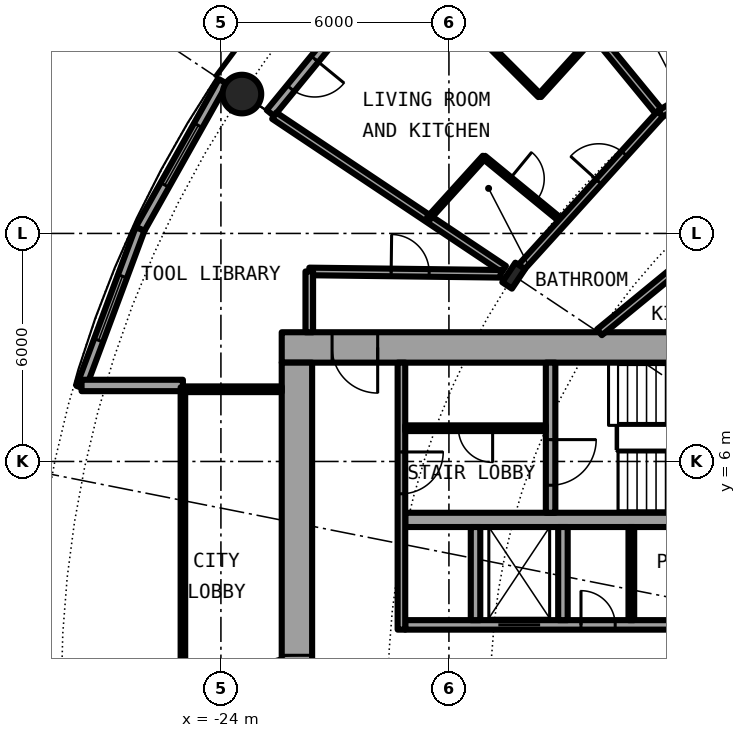
"""IFC4 building model, lengths in metres.
Left out: names, types, materials, properties, quantities, classifications, styles, units other than length and angle.
Written with IfcOpenShell. Run it as: python <this file> out.ifc"""

import sys

from ifc_helpers import new_model, si_unit, direction, frame, frame_2d, origin, origin_2d, place, context, subcontext, project, spatial, rectangle, hollow_circle, i_section, extrude, element, fill, save


model = new_model("IFC4")
c1 = context("Model", 3, precision=1e-05, world=origin(), true_north=direction((0.0, 1.0)))
c2 = subcontext(c1, "Body", "Model", "MODEL_VIEW")
j1 = project(units=[si_unit("LENGTHUNIT", "METRE"), si_unit("PLANEANGLEUNIT", "RADIAN")], contexts=[c1])
p1 = place(None, origin())
s1 = spatial("IfcSite", under=j1, at=p1, CompositionType="ELEMENT")
p2 = place(p1, origin())
s2 = spatial("IfcBuilding", under=s1, at=p2, CompositionType="ELEMENT")
p3 = place(p2, frame((0.0, 0.0, 22.8)))
s3 = spatial("IfcBuildingStorey", under=s2, at=p3, CompositionType="ELEMENT", Elevation=22.8)
p4 = place(p3, frame((-23.448, 15.667, 0.0), z_axis=(0.0, 0.0, 1.0), x_axis=(1.0, 0.0, 0.0)))
e1 = element("IfcColumn", 1, at=p4, inside=s3, PredefinedType="COLUMN", context=c2, shape_type="SweptSolid", body=[
    extrude(hollow_circle(Radius=0.508, WallThickness=0.05, at=origin_2d()), origin(), (0.0, 0.0, 1.0), 3.05),
])
p5 = place(p3, frame((-16.297, 10.889, 0.0), z_axis=(0.0, 0.0, 1.0), x_axis=(-0.831469612303, 0.55557023302, 0.0)))
e2 = element("IfcColumn", 2, at=p5, inside=s3, PredefinedType="COLUMN", context=c2, shape_type="SweptSolid", body=[
    extrude(i_section(OverallWidth=0.305, OverallDepth=0.62, WebThickness=0.021, FlangeThickness=0.04, FilletRadius=0.027, at=origin_2d()), origin(), (0.0, 0.0, 1.0), 3.05),
])
p6 = place(p3, frame((-19.304, 19.304, 0.0), z_axis=(0.0, 0.0, 1.0), x_axis=(-0.634382322723, -0.773019449054, 0.0)))
e3 = element("IfcWall", 3, at=p6, inside=s3, PredefinedType="SOLIDWALL", context=c2, shape_type="SweptSolid", body=[
    extrude(rectangle(XDim=5.352, YDim=0.25, at=frame_2d((2.676, 0.0))), origin(), (0.0, 0.0, 1.0), 2.7),
])
p7 = place(p6, frame((0.441, 0.0, 0.3)))
e4 = element("IfcOpeningElement", 4, at=p7, cuts=e3, PredefinedType="OPENING", context=c2, shape_type="SweptSolid", body=[
    extrude(rectangle(XDim=1.8, YDim=2.1, at=frame_2d((0.9, 1.05))), frame((0.0, 0.135, 0.0), z_axis=(0.0, -1.0, 0.0), x_axis=(1.0, 0.0, 0.0)), (0.0, 0.0, 1.0), 0.27),
])
p8 = place(p6, frame((3.51, 0.0, 0.0)))
e5 = element("IfcOpeningElement", 5, at=p8, cuts=e3, PredefinedType="OPENING", context=c2, shape_type="SweptSolid", body=[
    extrude(rectangle(XDim=1.0, YDim=2.2, at=frame_2d((0.5, 1.1))), frame((0.0, 0.135, 0.0), z_axis=(0.0, -1.0, 0.0), x_axis=(1.0, 0.0, 0.0)), (0.0, 0.0, 1.0), 0.27),
])
p9 = place(p3, frame((-23.946, 16.0, 0.0), z_axis=(0.0, 0.0, 1.0), x_axis=(-0.489696356642, -0.871893042919, 0.0)))
e6 = element("IfcWall", 6, at=p9, inside=s3, PredefinedType="SOLIDWALL", context=c2, shape_type="SweptSolid", body=[
    extrude(rectangle(XDim=4.454, YDim=0.25, at=frame_2d((2.227, 0.0))), origin(), (0.0, 0.0, 1.0), 2.7),
])
p10 = place(p9, frame((1.327, 0.0, 0.3)))
e7 = element("IfcOpeningElement", 7, at=p10, cuts=e6, PredefinedType="OPENING", context=c2, shape_type="SweptSolid", body=[
    extrude(rectangle(XDim=1.8, YDim=2.1, at=frame_2d((0.9, 1.05))), frame((0.0, 0.135, 0.0), z_axis=(0.0, -1.0, 0.0), x_axis=(1.0, 0.0, 0.0)), (0.0, 0.0, 1.0), 0.27),
])
p11 = place(p3, frame((-26.127, 12.117, 0.0), z_axis=(0.0, 0.0, 1.0), x_axis=(-0.349247811493, -0.937030397675, 0.0)))
e8 = element("IfcWall", 8, at=p11, inside=s3, PredefinedType="SOLIDWALL", context=c2, shape_type="SweptSolid", body=[
    extrude(rectangle(XDim=4.452, YDim=0.25, at=frame_2d((2.226, 0.0))), origin(), (0.0, 0.0, 1.0), 2.7),
])
p12 = place(p11, frame((1.327, 0.0, 0.3)))
e9 = element("IfcOpeningElement", 9, at=p12, cuts=e8, PredefinedType="OPENING", context=c2, shape_type="SweptSolid", body=[
    extrude(rectangle(XDim=1.8, YDim=2.1, at=frame_2d((0.9, 1.05))), frame((0.0, 0.135, 0.0), z_axis=(0.0, -1.0, 0.0), x_axis=(1.0, 0.0, 0.0)), (0.0, 0.0, 1.0), 0.27),
])
p13 = place(p3, frame((-25.0, 8.0, 0.0), z_axis=(0.0, 0.0, 1.0), x_axis=(-1.0, 0.0, 0.0)))
e10 = element("IfcWall", 10, at=p13, inside=s3, PredefinedType="SOLIDWALL", context=c2, shape_type="SweptSolid", body=[
    extrude(rectangle(XDim=2.667, YDim=0.3, at=frame_2d((1.333, 0.0))), origin(), (0.0, 0.0, 1.0), 2.7),
])
p14 = place(p3, frame((-8.2, 9.0, 0.0), z_axis=(0.0, 0.0, 1.0), x_axis=(-1.0, 0.0, 0.0)))
e11 = element("IfcWall", 11, at=p14, inside=s3, PredefinedType="SHEAR", context=c2, shape_type="SweptSolid", body=[
    extrude(rectangle(XDim=14.2, YDim=0.8, at=frame_2d((7.1, 0.0))), origin(), (0.0, 0.0, 1.0), 3.05),
])
p15 = place(p14, frame((11.675, 0.0, 0.0)))
e12 = element("IfcOpeningElement", 12, at=p15, cuts=e11, PredefinedType="OPENING", context=c2, shape_type="SweptSolid", body=[
    extrude(rectangle(XDim=1.2, YDim=2.3, at=frame_2d((0.6, 1.15))), frame((0.0, 0.41, 0.0), z_axis=(0.0, -1.0, 0.0), x_axis=(1.0, 0.0, 0.0)), (0.0, 0.0, 1.0), 0.82),
])
p16 = place(p3, frame((-22.0, -8.6, 0.0), z_axis=(0.0, 0.0, 1.0), x_axis=(0.0, 1.0, 0.0)))
e13 = element("IfcWall", 13, at=p16, inside=s3, PredefinedType="SHEAR", context=c2, shape_type="SweptSolid", body=[
    extrude(rectangle(XDim=17.2, YDim=0.8, at=frame_2d((8.6, 0.0))), origin(), (0.0, 0.0, 1.0), 3.05),
])
p17 = place(p16, frame((7.7, 0.0, 0.0)))
e14 = element("IfcOpeningElement", 14, at=p17, cuts=e13, PredefinedType="OPENING", context=c2, shape_type="SweptSolid", body=[
    extrude(rectangle(XDim=1.8, YDim=2.3, at=frame_2d((0.9, 1.15))), frame((0.0, 0.41, 0.0), z_axis=(0.0, -1.0, 0.0), x_axis=(1.0, 0.0, 0.0)), (0.0, 0.0, 1.0), 0.82),
])
p18 = place(p3, frame((-19.15, 1.7, 0.0), z_axis=(0.0, 0.0, 1.0), x_axis=(1.0, 0.0, 0.0)))
e15 = element("IfcWall", 15, at=p18, inside=s3, PredefinedType="SHEAR", context=c2, shape_type="SweptSolid", body=[
    extrude(rectangle(XDim=10.15, YDim=0.25, at=frame_2d((5.075, 0.0))), origin(), (0.0, 0.0, 1.0), 3.05),
])
p19 = place(p18, frame((2.45, 0.0, 0.0)))
e16 = element("IfcOpeningElement", 16, at=p19, cuts=e15, PredefinedType="OPENING", context=c2, shape_type="SweptSolid", body=[
    extrude(rectangle(XDim=1.1, YDim=2.3, at=frame_2d((0.55, 1.15))), frame((0.0, 0.135, 0.0), z_axis=(0.0, -1.0, 0.0), x_axis=(1.0, 0.0, 0.0)), (0.0, 0.0, 1.0), 0.27),
])
p20 = place(p18, frame((7.637, 0.0, 0.0)))
e17 = element("IfcOpeningElement", 17, at=p20, cuts=e15, PredefinedType="OPENING", context=c2, shape_type="SweptSolid", body=[
    extrude(rectangle(XDim=0.9, YDim=2.3, at=frame_2d((0.45, 1.15))), frame((0.0, 0.135, 0.0), z_axis=(0.0, -1.0, 0.0), x_axis=(1.0, 0.0, 0.0)), (0.0, 0.0, 1.0), 0.27),
])
p21 = place(p18, frame((4.625, 0.0, 0.0)))
e18 = element("IfcOpeningElement", 18, at=p21, cuts=e15, PredefinedType="OPENING", context=c2, shape_type="SweptSolid", body=[
    extrude(rectangle(XDim=0.9, YDim=2.3, at=frame_2d((0.45, 1.15))), frame((0.0, 0.135, 0.0), z_axis=(0.0, -1.0, 0.0), x_axis=(1.0, 0.0, 0.0)), (0.0, 0.0, 1.0), 0.27),
])
p22 = place(p3, frame((-9.0, 4.462, 0.0), z_axis=(0.0, 0.0, 1.0), x_axis=(-1.0, 0.0, 0.0)))
e19 = element("IfcWall", 19, at=p22, inside=s3, PredefinedType="SHEAR", context=c2, shape_type="SweptSolid", body=[
    extrude(rectangle(XDim=10.15, YDim=0.375, at=frame_2d((5.075, 0.0))), origin(), (0.0, 0.0, 1.0), 3.05),
])
p23 = place(p3, frame((-15.325, 8.6, 0.0), z_axis=(0.0, 0.0, 1.0), x_axis=(0.0, -1.0, 0.0)))
e20 = element("IfcWall", 20, at=p23, inside=s3, PredefinedType="SHEAR", context=c2, shape_type="SweptSolid", body=[
    extrude(rectangle(XDim=3.95, YDim=0.25, at=frame_2d((1.975, 0.0))), origin(), (0.0, 0.0, 1.0), 3.05),
])
p24 = place(p23, frame((2.025, 0.0, 0.0)))
e21 = element("IfcOpeningElement", 21, at=p24, cuts=e20, PredefinedType="OPENING", context=c2, shape_type="SweptSolid", body=[
    extrude(rectangle(XDim=1.2, YDim=2.3, at=frame_2d((0.6, 1.15))), frame((0.0, 0.135, 0.0), z_axis=(0.0, -1.0, 0.0), x_axis=(1.0, 0.0, 0.0)), (0.0, 0.0, 1.0), 0.27),
])
for number, where, z_axis, x_axis in (
    (22, (-15.0, 1.825, 0.0), (0.0, 0.0, 1.0), (0.0, 1.0, 0.0)),
    (23, (-17.3, 1.825, 0.0), (0.0, 0.0, 1.0), (0.0, 1.0, 0.0)),
):
    element("IfcWall", number, at=place(p3, frame(where, z_axis=z_axis, x_axis=x_axis)), inside=s3, PredefinedType="SOLIDWALL", context=c2, shape_type="SweptSolid", body=[
        extrude(rectangle(XDim=2.45, YDim=0.25, at=frame_2d((1.225, 0.0))), origin(), (0.0, 0.0, 1.0), 2.7),
    ])
p25 = place(p3, frame((-19.25, 8.6, 0.0), z_axis=(0.0, 0.0, 1.0), x_axis=(0.0, -1.0, 0.0)))
e24 = element("IfcWall", 24, at=p25, inside=s3, PredefinedType="SOLIDWALL", context=c2, shape_type="SweptSolid", body=[
    extrude(rectangle(XDim=7.025, YDim=0.2, at=frame_2d((3.513, 0.0))), origin(), (0.0, 0.0, 1.0), 2.7),
])
p26 = place(p25, frame((2.35, 0.0, 0.0)))
e25 = element("IfcOpeningElement", 25, at=p26, cuts=e24, PredefinedType="OPENING", context=c2, shape_type="SweptSolid", body=[
    extrude(rectangle(XDim=1.1, YDim=2.3, at=frame_2d((0.55, 1.15))), frame((0.0, 0.11, 0.0), z_axis=(0.0, -1.0, 0.0), x_axis=(1.0, 0.0, 0.0)), (0.0, 0.0, 1.0), 0.22),
])
p27 = place(p3, frame((-13.2, 1.825, 0.0), z_axis=(0.0, 0.0, 1.0), x_axis=(0.0, 1.0, 0.0)))
e26 = element("IfcWall", 26, at=p27, inside=s3, PredefinedType="PARTITIONING", context=c2, shape_type="SweptSolid", body=[
    extrude(rectangle(XDim=2.45, YDim=0.15, at=frame_2d((1.225, 0.0))), origin(), (0.0, 0.0, 1.0), 2.7),
])
p28 = place(p3, frame((-15.45, 6.875, 0.0), z_axis=(0.0, 0.0, 1.0), x_axis=(-1.0, 0.0, 0.0)))
e27 = element("IfcWall", 27, at=p28, inside=s3, PredefinedType="PARTITIONING", context=c2, shape_type="SweptSolid", body=[
    extrude(rectangle(XDim=3.7, YDim=0.15, at=frame_2d((1.85, 0.0))), origin(), (0.0, 0.0, 1.0), 2.7),
])
p29 = place(p28, frame((1.4, 0.0, 0.0)))
e28 = element("IfcOpeningElement", 28, at=p29, cuts=e27, PredefinedType="OPENING", context=c2, shape_type="SweptSolid", body=[
    extrude(rectangle(XDim=0.9, YDim=2.3, at=frame_2d((0.45, 1.15))), frame((0.0, 0.085, 0.0), z_axis=(0.0, -1.0, 0.0), x_axis=(1.0, 0.0, 0.0)), (0.0, 0.0, 1.0), 0.17),
])
p30 = place(p3, frame((-22.4, 7.9, 0.0), z_axis=(0.0, 0.0, 1.0), x_axis=(-1.0, 0.0, 0.0)))
e29 = element("IfcWall", 29, at=p30, inside=s3, PredefinedType="PARTITIONING", context=c2, shape_type="SweptSolid", body=[
    extrude(rectangle(XDim=2.54, YDim=0.15, at=frame_2d((1.27, 0.0))), origin(), (0.0, 0.0, 1.0), 2.7),
])
p31 = place(p3, frame((-25.0, 7.95, 0.0), z_axis=(0.0, 0.0, 1.0), x_axis=(0.0, -1.0, 0.0)))
e30 = element("IfcWall", 30, at=p31, inside=s3, PredefinedType="PARTITIONING", context=c2, shape_type="SweptSolid", body=[
    extrude(rectangle(XDim=15.9, YDim=0.12, at=frame_2d((7.95, 0.0))), origin(), (0.0, 0.0, 1.0), 2.7),
])
p32 = place(p31, frame((0.95, 0.0, 0.1)))
e31 = element("IfcOpeningElement", 31, at=p32, cuts=e30, PredefinedType="OPENING", context=c2, shape_type="SweptSolid", body=[
    extrude(rectangle(XDim=14.0, YDim=2.35, at=frame_2d((7.0, 1.175))), frame((0.0, 0.07, 0.0), z_axis=(0.0, -1.0, 0.0), x_axis=(1.0, 0.0, 0.0)), (0.0, 0.0, 1.0), 0.14),
])
p33 = place(p3, frame((-22.596, 15.097, 0.0), z_axis=(0.0, 0.0, 1.0), x_axis=(0.831507055747, -0.555514190857, 0.0)))
e32 = element("IfcWall", 32, at=p33, inside=s3, PredefinedType="PARTITIONING", context=c2, shape_type="SweptSolid", body=[
    extrude(rectangle(XDim=7.265, YDim=0.2, at=frame_2d((3.633, 0.0))), origin(), (0.0, 0.0, 1.0), 2.7),
])
p34 = place(p3, frame((-19.21, 19.222, 0.0), z_axis=(0.0, 0.0, 1.0), x_axis=(0.706914880313, -0.707298629994, 0.0)))
e33 = element("IfcWall", 33, at=p34, inside=s3, PredefinedType="PARTITIONING", context=c2, shape_type="SweptSolid", body=[
    extrude(rectangle(XDim=5.09, YDim=0.1, at=frame_2d((2.545, 0.0))), origin(), (0.0, 0.0, 1.0), 2.7),
])
p35 = place(p34, frame((2.095, 0.0, 0.0)))
e34 = element("IfcOpeningElement", 34, at=p35, cuts=e33, PredefinedType="OPENING", context=c2, shape_type="SweptSolid", body=[
    extrude(rectangle(XDim=0.9, YDim=2.3, at=frame_2d((0.45, 1.15))), frame((0.0, 0.06, 0.0), z_axis=(0.0, -1.0, 0.0), x_axis=(1.0, 0.0, 0.0)), (0.0, 0.0, 1.0), 0.12),
])
p36 = place(p3, frame((-17.239, 21.008, 0.0), z_axis=(0.0, 0.0, 1.0), x_axis=(0.634318093068, -0.773072154981, 0.0)))
e35 = element("IfcWall", 35, at=p36, inside=s3, PredefinedType="PARTITIONING", context=c2, shape_type="SweptSolid", body=[
    extrude(rectangle(XDim=7.576, YDim=0.2, at=frame_2d((3.788, 0.0))), origin(), (0.0, 0.0, 1.0), 2.7),
])
p37 = place(p3, frame((-17.079, 14.004, 0.0), z_axis=(0.0, 0.0, 1.0), x_axis=(0.773424377054, -0.633888580887, 0.0)))
e36 = element("IfcWall", 36, at=p37, inside=s3, PredefinedType="PARTITIONING", context=c2, shape_type="SweptSolid", body=[
    extrude(rectangle(XDim=2.675, YDim=0.1, at=frame_2d((1.338, 0.0))), origin(), (0.0, 0.0, 1.0), 2.7),
])
p38 = place(p37, frame((0.888, 0.0, 0.0)))
e37 = element("IfcOpeningElement", 37, at=p38, cuts=e36, PredefinedType="OPENING", context=c2, shape_type="SweptSolid", body=[
    extrude(rectangle(XDim=0.9, YDim=2.3, at=frame_2d((0.45, 1.15))), frame((0.0, 0.06, 0.0), z_axis=(0.0, -1.0, 0.0), x_axis=(1.0, 0.0, 0.0)), (0.0, 0.0, 1.0), 0.12),
])
p39 = place(p3, frame((-12.276, 18.36, 0.0), z_axis=(0.0, 0.0, 1.0), x_axis=(0.55563200073, -0.831428337119, 0.0)))
e38 = element("IfcWall", 38, at=p39, inside=s3, PredefinedType="PARTITIONING", context=c2, shape_type="SweptSolid", body=[
    extrude(rectangle(XDim=2.176, YDim=0.1, at=frame_2d((1.088, 0.0))), origin(), (0.0, 0.0, 1.0), 2.7),
])
p40 = place(p39, frame((0.887, 0.0, 0.0)))
e39 = element("IfcOpeningElement", 39, at=p40, cuts=e38, PredefinedType="OPENING", context=c2, shape_type="SweptSolid", body=[
    extrude(rectangle(XDim=0.9, YDim=2.3, at=frame_2d((0.45, 1.15))), frame((0.0, 0.06, 0.0), z_axis=(0.0, -1.0, 0.0), x_axis=(1.0, 0.0, 0.0)), (0.0, 0.0, 1.0), 0.12),
])
p41 = place(p3, frame((-21.675, 11.0, 0.0), z_axis=(0.0, 0.0, 1.0), x_axis=(0.99992425795, -0.012307654658, 0.0)))
e40 = element("IfcWall", 40, at=p41, inside=s3, PredefinedType="PARTITIONING", context=c2, shape_type="SweptSolid", body=[
    extrude(rectangle(XDim=5.039, YDim=0.2, at=frame_2d((2.519, 0.0))), origin(), (0.0, 0.0, 1.0), 2.7),
])
p42 = place(p41, frame((2.155, 0.0, 0.0)))
e41 = element("IfcOpeningElement", 41, at=p42, cuts=e40, PredefinedType="OPENING", context=c2, shape_type="SweptSolid", body=[
    extrude(rectangle(XDim=1.0, YDim=2.3, at=frame_2d((0.5, 1.15))), frame((0.0, 0.11, 0.0), z_axis=(0.0, -1.0, 0.0), x_axis=(1.0, 0.0, 0.0)), (0.0, 0.0, 1.0), 0.22),
])
p43 = place(p3, frame((-14.039, 9.4, 0.0), z_axis=(0.0, 0.0, 1.0), x_axis=(0.77298340166, 0.634426245326, 0.0)))
e42 = element("IfcWall", 42, at=p43, inside=s3, PredefinedType="PARTITIONING", context=c2, shape_type="SweptSolid", body=[
    extrude(rectangle(XDim=9.793, YDim=0.2, at=frame_2d((4.896, 0.0))), origin(), (0.0, 0.0, 1.0), 2.7),
])
p44 = place(p43, frame((4.389, 0.0, 0.0)))
e43 = element("IfcOpeningElement", 43, at=p44, cuts=e42, PredefinedType="OPENING", context=c2, shape_type="SweptSolid", body=[
    extrude(rectangle(XDim=1.0, YDim=2.3, at=frame_2d((0.5, 1.15))), frame((0.0, 0.11, 0.0), z_axis=(0.0, -1.0, 0.0), x_axis=(1.0, 0.0, 0.0)), (0.0, 0.0, 1.0), 0.22),
])
p45 = place(p3, frame((-16.193, 11.003, 0.0), z_axis=(0.0, 0.0, 1.0), x_axis=(0.671514934772, 0.740991020444, 0.0)))
e44 = element("IfcWall", 44, at=p45, inside=s3, PredefinedType="PARTITIONING", context=c2, shape_type="SweptSolid", body=[
    extrude(rectangle(XDim=5.598, YDim=0.2, at=frame_2d((2.799, 0.0))), origin(), (0.0, 0.0, 1.0), 2.38),
])
p46 = place(p45, frame((3.18, 0.0, 0.0)))
e45 = element("IfcOpeningElement", 45, at=p46, cuts=e44, PredefinedType="OPENING", context=c2, shape_type="SweptSolid", body=[
    extrude(rectangle(XDim=1.0, YDim=2.3, at=frame_2d((0.5, 1.15))), frame((0.0, 0.11, 0.0), z_axis=(0.0, -1.0, 0.0), x_axis=(1.0, 0.0, 0.0)), (0.0, 0.0, 1.0), 0.22),
])
p47 = place(p3, frame((-12.434, 15.151, 0.0), z_axis=(0.0, 0.0, 1.0), x_axis=(0.857809047014, 0.513968519329, 0.0)))
e46 = element("IfcWall", 46, at=p47, inside=s3, PredefinedType="PARTITIONING", context=c2, shape_type="SweptSolid", body=[
    extrude(rectangle(XDim=1.771, YDim=0.2, at=frame_2d((0.885, 0.0))), origin(), (0.0, 0.0, 1.0), 2.38),
])
p48 = place(p3, frame((-21.675, 9.4, 0.0), z_axis=(0.0, 0.0, 1.0), x_axis=(0.0, 1.0, 0.0)))
e47 = element("IfcWall", 47, at=p48, inside=s3, PredefinedType="PARTITIONING", context=c2, shape_type="SweptSolid", body=[
    extrude(rectangle(XDim=1.6, YDim=0.2, at=frame_2d((0.8, 0.0))), origin(), (0.0, 0.0, 1.0), 2.7),
])
p49 = place(p3, frame((-18.538, 12.394, 0.0), z_axis=(0.0, 0.0, 1.0), x_axis=(0.67169789574, 0.740825172937, 0.0)))
e48 = element("IfcWall", 48, at=p49, inside=s3, PredefinedType="PARTITIONING", context=c2, shape_type="SweptSolid", body=[
    extrude(rectangle(XDim=2.183, YDim=0.1, at=frame_2d((1.091, 0.0))), origin(), (0.0, 0.0, 1.0), 2.7),
])
p50 = place(p3, frame((-15.612, 15.622, 0.0), z_axis=(0.0, 0.0, 1.0), x_axis=(0.671674967707, 0.740845960882, 0.0)))
e49 = element("IfcWall", 49, at=p50, inside=s3, PredefinedType="PARTITIONING", context=c2, shape_type="SweptSolid", body=[
    extrude(rectangle(XDim=2.181, YDim=0.1, at=frame_2d((1.091, 0.0))), origin(), (0.0, 0.0, 1.0), 2.7),
])
p51 = place(p8, origin())
e50 = element("IfcDoor", 50, at=p51, inside=s3, OperationType="SINGLE_SWING_LEFT", PredefinedType="DOOR", context=c2, shape_type="SweptSolid", body=[
    extrude(rectangle(XDim=1.0, YDim=2.2, at=frame_2d((0.5, 1.1))), frame((0.0, 0.025, 0.0), z_axis=(0.0, -1.0, 0.0), x_axis=(1.0, 0.0, 0.0)), (0.0, 0.0, 1.0), 0.05),
])
fill(e5, e50)
p52 = place(p10, origin())
e51 = element("IfcWindow", 51, at=p52, inside=s3, PartitioningType="SINGLE_PANEL", PredefinedType="WINDOW", context=c2, shape_type="SweptSolid", body=[
    extrude(rectangle(XDim=1.8, YDim=2.1, at=frame_2d((0.9, 1.05))), frame((0.0, 0.03, 0.0), z_axis=(0.0, -1.0, 0.0), x_axis=(1.0, 0.0, 0.0)), (0.0, 0.0, 1.0), 0.06),
])
fill(e7, e51)
p53 = place(p12, origin())
e52 = element("IfcWindow", 52, at=p53, inside=s3, PartitioningType="SINGLE_PANEL", PredefinedType="WINDOW", context=c2, shape_type="SweptSolid", body=[
    extrude(rectangle(XDim=1.8, YDim=2.1, at=frame_2d((0.9, 1.05))), frame((0.0, 0.03, 0.0), z_axis=(0.0, -1.0, 0.0), x_axis=(1.0, 0.0, 0.0)), (0.0, 0.0, 1.0), 0.06),
])
fill(e9, e52)
p54 = place(p19, origin())
e53 = element("IfcDoor", 53, at=p54, inside=s3, OperationType="DOUBLE_DOOR_SLIDING", PredefinedType="DOOR", context=c2, shape_type="SweptSolid", body=[
    extrude(rectangle(XDim=1.1, YDim=2.3, at=frame_2d((0.55, 1.15))), frame((0.0, 0.025, 0.0), z_axis=(0.0, -1.0, 0.0), x_axis=(1.0, 0.0, 0.0)), (0.0, 0.0, 1.0), 0.05),
])
fill(e16, e53)
p55 = place(p21, origin())
e54 = element("IfcDoor", 54, at=p55, inside=s3, OperationType="SINGLE_SWING_LEFT", PredefinedType="DOOR", context=c2, shape_type="SweptSolid", body=[
    extrude(rectangle(XDim=0.9, YDim=2.3, at=frame_2d((0.45, 1.15))), frame((0.0, 0.025, 0.0), z_axis=(0.0, -1.0, 0.0), x_axis=(1.0, 0.0, 0.0)), (0.0, 0.0, 1.0), 0.05),
])
fill(e18, e54)
p56 = place(p29, origin())
e55 = element("IfcDoor", 55, at=p56, inside=s3, OperationType="SINGLE_SWING_LEFT", PredefinedType="DOOR", context=c2, shape_type="SweptSolid", body=[
    extrude(rectangle(XDim=0.9, YDim=2.3, at=frame_2d((0.45, 1.15))), frame((0.0, 0.025, 0.0), z_axis=(0.0, -1.0, 0.0), x_axis=(1.0, 0.0, 0.0)), (0.0, 0.0, 1.0), 0.05),
])
fill(e28, e55)
p57 = place(p24, origin())
e56 = element("IfcDoor", 56, at=p57, inside=s3, OperationType="SINGLE_SWING_LEFT", PredefinedType="DOOR", context=c2, shape_type="SweptSolid", body=[
    extrude(rectangle(XDim=1.2, YDim=2.3, at=frame_2d((0.6, 1.15))), frame((0.0, 0.025, 0.0), z_axis=(0.0, -1.0, 0.0), x_axis=(1.0, 0.0, 0.0)), (0.0, 0.0, 1.0), 0.05),
])
fill(e21, e56)
p58 = place(p26, origin())
e57 = element("IfcDoor", 57, at=p58, inside=s3, OperationType="SINGLE_SWING_RIGHT", PredefinedType="DOOR", context=c2, shape_type="SweptSolid", body=[
    extrude(rectangle(XDim=1.1, YDim=2.3, at=frame_2d((0.55, 1.15))), frame((0.0, 0.025, 0.0), z_axis=(0.0, -1.0, 0.0), x_axis=(1.0, 0.0, 0.0)), (0.0, 0.0, 1.0), 0.05),
])
fill(e25, e57)
p59 = place(p15, origin())
e58 = element("IfcDoor", 58, at=p59, inside=s3, OperationType="SINGLE_SWING_LEFT", PredefinedType="DOOR", context=c2, shape_type="SweptSolid", body=[
    extrude(rectangle(XDim=1.2, YDim=2.3, at=frame_2d((0.6, 1.15))), frame((0.0, 0.025, 0.0), z_axis=(0.0, -1.0, 0.0), x_axis=(1.0, 0.0, 0.0)), (0.0, 0.0, 1.0), 0.05),
])
fill(e12, e58)
p60 = place(p17, origin())
e59 = element("IfcDoor", 59, at=p60, inside=s3, OperationType="SINGLE_SWING_LEFT", PredefinedType="DOOR", context=c2, shape_type="SweptSolid", body=[
    extrude(rectangle(XDim=1.8, YDim=2.3, at=frame_2d((0.9, 1.15))), frame((0.0, 0.025, 0.0), z_axis=(0.0, -1.0, 0.0), x_axis=(1.0, 0.0, 0.0)), (0.0, 0.0, 1.0), 0.05),
])
fill(e14, e59)
p61 = place(p32, origin())
e60 = element("IfcWindow", 60, at=p61, inside=s3, PartitioningType="SINGLE_PANEL", PredefinedType="WINDOW", context=c2, shape_type="SweptSolid", body=[
    extrude(rectangle(XDim=14.0, YDim=2.35, at=frame_2d((7.0, 1.175))), frame((0.0, 0.03, 0.0), z_axis=(0.0, -1.0, 0.0), x_axis=(1.0, 0.0, 0.0)), (0.0, 0.0, 1.0), 0.06),
])
fill(e31, e60)
p62 = place(p46, origin())
e61 = element("IfcDoor", 61, at=p62, inside=s3, OperationType="SINGLE_SWING_RIGHT", PredefinedType="DOOR", context=c2, shape_type="SweptSolid", body=[
    extrude(rectangle(XDim=1.0, YDim=2.3, at=frame_2d((0.5, 1.15))), frame((0.0, 0.025, 0.0), z_axis=(0.0, -1.0, 0.0), x_axis=(1.0, 0.0, 0.0)), (0.0, 0.0, 1.0), 0.05),
])
fill(e45, e61)
p63 = place(p38, origin())
e62 = element("IfcDoor", 62, at=p63, inside=s3, OperationType="SINGLE_SWING_LEFT", PredefinedType="DOOR", context=c2, shape_type="SweptSolid", body=[
    extrude(rectangle(XDim=0.9, YDim=2.3, at=frame_2d((0.45, 1.15))), frame((0.0, 0.025, 0.0), z_axis=(0.0, -1.0, 0.0), x_axis=(1.0, 0.0, 0.0)), (0.0, 0.0, 1.0), 0.05),
])
fill(e37, e62)
p64 = place(p42, origin())
e63 = element("IfcDoor", 63, at=p64, inside=s3, OperationType="SINGLE_SWING_RIGHT", PredefinedType="DOOR", context=c2, shape_type="SweptSolid", body=[
    extrude(rectangle(XDim=1.0, YDim=2.3, at=frame_2d((0.5, 1.15))), frame((0.0, 0.025, 0.0), z_axis=(0.0, -1.0, 0.0), x_axis=(1.0, 0.0, 0.0)), (0.0, 0.0, 1.0), 0.05),
])
fill(e41, e63)
save(model, sys.argv[1])
